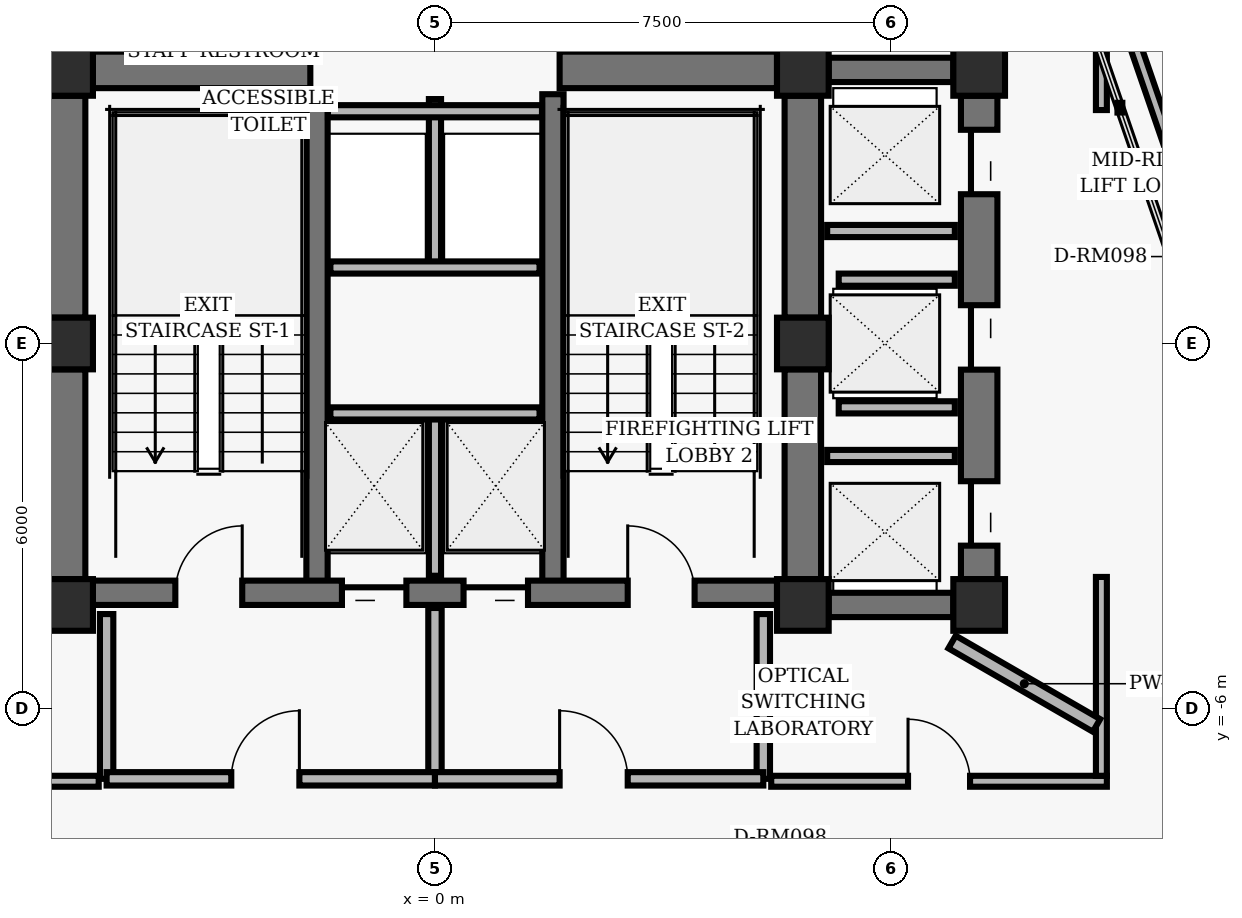
"""IFC4 building model, lengths in metres.
Left out: names, types, materials, properties, quantities, classifications, styles, units other than length and angle.
Written with IfcOpenShell. Run it as: python <this file> out.ifc"""

import sys

from ifc_helpers import new_model, si_unit, direction, frame, frame_2d, origin, origin_2d, place, context, subcontext, project, spatial, rectangle, hollow_rectangle, extrude, element, fill, save


model = new_model("IFC4")
c1 = context("Model", 3, precision=1e-05, world=origin(), true_north=direction((0.0, 1.0)))
c2 = subcontext(c1, "Body", "Model", "MODEL_VIEW")
j1 = project(units=[si_unit("LENGTHUNIT", "METRE"), si_unit("PLANEANGLEUNIT", "RADIAN")], contexts=[c1])
p1 = place(None, origin())
s1 = spatial("IfcSite", under=j1, at=p1, CompositionType="ELEMENT")
p2 = place(p1, origin())
s2 = spatial("IfcBuilding", under=s1, at=p2, CompositionType="ELEMENT")
p3 = place(p2, frame((0.0, 0.0, 165.44)))
s3 = spatial("IfcBuildingStorey", under=s2, at=p3, CompositionType="ELEMENT", Elevation=165.44)
for number, where, z_axis, x_axis in (
    (1, (-6.05, 4.5, 0.0), (0.0, 0.0, 1.0), (1.0, 0.0, 0.0)),
    (2, (6.05, 4.5, 0.0), (0.0, 0.0, 1.0), (1.0, 0.0, 0.0)),
    (3, (-6.05, 0.0, 0.0), (0.0, 0.0, 1.0), (1.0, 0.0, 0.0)),
    (4, (6.05, 0.0, 0.0), (0.0, 0.0, 1.0), (1.0, 0.0, 0.0)),
    (5, (-6.05, -4.3, 0.0), (0.0, 0.0, 1.0), (1.0, 0.0, 0.0)),
    (6, (6.05, -4.3, 0.0), (0.0, 0.0, 1.0), (1.0, 0.0, 0.0)),
    (7, (8.95, 4.5, 0.0), (0.0, 0.0, 1.0), (1.0, 0.0, 0.0)),
    (8, (8.95, -4.3, 0.0), (0.0, 0.0, 1.0), (1.0, 0.0, 0.0)),
):
    element("IfcColumn", number, at=place(p3, frame(where, z_axis=z_axis, x_axis=x_axis)), inside=s3, PredefinedType="COLUMN", context=c2, shape_type="SweptSolid", body=[
        extrude(hollow_rectangle(XDim=0.85, YDim=0.85, WallThickness=0.055, InnerFilletRadius=0.02, OuterFilletRadius=0.04, at=origin_2d()), origin(), (0.0, 0.0, 1.0), 3.04),
    ])
p4 = place(p3, frame((-6.05, 0.425, 0.0), z_axis=(0.0, 0.0, 1.0), x_axis=(0.0, 1.0, 0.0)))
e9 = element("IfcWall", 9, at=p4, inside=s3, PredefinedType="SHEAR", context=c2, shape_type="SweptSolid", body=[
    extrude(rectangle(XDim=3.65, YDim=0.6, at=frame_2d((1.825, 0.0))), origin(), (0.0, 0.0, 1.0), 2.788),
])
p5 = place(p3, frame((-6.05, -3.875, 0.0), z_axis=(0.0, 0.0, 1.0), x_axis=(0.0, 1.0, 0.0)))
e10 = element("IfcWall", 10, at=p5, inside=s3, PredefinedType="SHEAR", context=c2, shape_type="SweptSolid", body=[
    extrude(rectangle(XDim=3.45, YDim=0.6, at=frame_2d((1.725, 0.0))), origin(), (0.0, 0.0, 1.0), 2.788),
])
p6 = place(p3, frame((6.05, 0.425, 0.0), z_axis=(0.0, 0.0, 1.0), x_axis=(0.0, 1.0, 0.0)))
e11 = element("IfcWall", 11, at=p6, inside=s3, PredefinedType="SHEAR", context=c2, shape_type="SweptSolid", body=[
    extrude(rectangle(XDim=3.65, YDim=0.6, at=frame_2d((1.825, 0.0))), origin(), (0.0, 0.0, 1.0), 2.788),
])
p7 = place(p3, frame((6.05, -3.875, 0.0), z_axis=(0.0, 0.0, 1.0), x_axis=(0.0, 1.0, 0.0)))
e12 = element("IfcWall", 12, at=p7, inside=s3, PredefinedType="SHEAR", context=c2, shape_type="SweptSolid", body=[
    extrude(rectangle(XDim=3.45, YDim=0.6, at=frame_2d((1.725, 0.0))), origin(), (0.0, 0.0, 1.0), 2.788),
])
for number, where, z_axis, x_axis in (
    (13, (-1.94, -4.1, 0.0), (0.0, 0.0, 1.0), (0.0, 1.0, 0.0)),
    (14, (1.94, -4.1, 0.0), (0.0, 0.0, 1.0), (0.0, 1.0, 0.0)),
):
    element("IfcWall", number, at=place(p3, frame(where, z_axis=z_axis, x_axis=x_axis)), inside=s3, PredefinedType="SHEAR", context=c2, shape_type="SweptSolid", body=[
        extrude(rectangle(XDim=8.2, YDim=0.35, at=frame_2d((4.1, 0.0))), origin(), (0.0, 0.0, 1.0), 2.788),
    ])
p8 = place(p3, frame((-5.625, -4.1, 0.0), z_axis=(0.0, 0.0, 1.0), x_axis=(1.0, 0.0, 0.0)))
e15 = element("IfcWall", 15, at=p8, inside=s3, PredefinedType="SHEAR", context=c2, shape_type="SweptSolid", body=[
    extrude(rectangle(XDim=11.25, YDim=0.4, at=frame_2d((5.625, 0.0))), origin(), (0.0, 0.0, 1.0), 2.788),
])
p9 = place(p8, frame((1.355, 0.0, 0.0)))
e16 = element("IfcOpeningElement", 16, at=p9, cuts=e15, PredefinedType="OPENING", context=c2, shape_type="SweptSolid", body=[
    extrude(rectangle(XDim=1.1, YDim=2.04, at=frame_2d((0.55, 1.02))), frame((0.0, 0.21, 0.0), z_axis=(0.0, -1.0, 0.0), x_axis=(1.0, 0.0, 0.0)), (0.0, 0.0, 1.0), 0.42),
])
p10 = place(p8, frame((8.795, 0.0, 0.0)))
e17 = element("IfcOpeningElement", 17, at=p10, cuts=e15, PredefinedType="OPENING", context=c2, shape_type="SweptSolid", body=[
    extrude(rectangle(XDim=1.1, YDim=2.04, at=frame_2d((0.55, 1.02))), frame((0.0, 0.21, 0.0), z_axis=(0.0, -1.0, 0.0), x_axis=(1.0, 0.0, 0.0)), (0.0, 0.0, 1.0), 0.42),
])
p11 = place(p8, frame((4.095, 0.0, 0.0)))
e18 = element("IfcOpeningElement", 18, at=p11, cuts=e15, PredefinedType="OPENING", context=c2, shape_type="SweptSolid", body=[
    extrude(rectangle(XDim=1.06, YDim=2.04, at=frame_2d((0.53, 1.02))), frame((0.0, 0.21, 0.0), z_axis=(0.0, -1.0, 0.0), x_axis=(1.0, 0.0, 0.0)), (0.0, 0.0, 1.0), 0.42),
])
p12 = place(p8, frame((6.095, 0.0, 0.0)))
e19 = element("IfcOpeningElement", 19, at=p12, cuts=e15, PredefinedType="OPENING", context=c2, shape_type="SweptSolid", body=[
    extrude(rectangle(XDim=1.06, YDim=2.04, at=frame_2d((0.53, 1.02))), frame((0.0, 0.21, 0.0), z_axis=(0.0, -1.0, 0.0), x_axis=(1.0, 0.0, 0.0)), (0.0, 0.0, 1.0), 0.42),
])
for number, where, z_axis, x_axis in (
    (20, (-5.625, 4.5, 0.0), (0.0, 0.0, 1.0), (1.0, 0.0, 0.0)),
    (21, (2.05, 4.5, 0.0), (0.0, 0.0, 1.0), (1.0, 0.0, 0.0)),
):
    element("IfcWall", number, at=place(p3, frame(where, z_axis=z_axis, x_axis=x_axis)), inside=s3, PredefinedType="SHEAR", context=c2, shape_type="SweptSolid", body=[
        extrude(rectangle(XDim=3.575, YDim=0.6, at=frame_2d((1.788, 0.0))), origin(), (0.0, 0.0, 1.0), 2.788),
    ])
p13 = place(p3, frame((8.95, -3.875, 0.0), z_axis=(0.0, 0.0, 1.0), x_axis=(0.0, 1.0, 0.0)))
e22 = element("IfcWall", 22, at=p13, inside=s3, PredefinedType="SHEAR", context=c2, shape_type="SweptSolid", body=[
    extrude(rectangle(XDim=7.95, YDim=0.6, at=frame_2d((3.975, 0.0))), origin(), (0.0, 0.0, 1.0), 2.788),
])
p14 = place(p13, frame((0.55, 0.0, 0.0)))
e23 = element("IfcOpeningElement", 23, at=p14, cuts=e22, PredefinedType="OPENING", context=c2, shape_type="SweptSolid", body=[
    extrude(rectangle(XDim=1.06, YDim=2.04, at=frame_2d((0.53, 1.02))), frame((0.0, 0.31, 0.0), z_axis=(0.0, -1.0, 0.0), x_axis=(1.0, 0.0, 0.0)), (0.0, 0.0, 1.0), 0.62),
])
p15 = place(p13, frame((3.445, 0.0, 0.0)))
e24 = element("IfcOpeningElement", 24, at=p15, cuts=e22, PredefinedType="OPENING", context=c2, shape_type="SweptSolid", body=[
    extrude(rectangle(XDim=1.06, YDim=2.04, at=frame_2d((0.53, 1.02))), frame((0.0, 0.31, 0.0), z_axis=(0.0, -1.0, 0.0), x_axis=(1.0, 0.0, 0.0)), (0.0, 0.0, 1.0), 0.62),
])
p16 = place(p13, frame((6.33, 0.0, 0.0)))
e25 = element("IfcOpeningElement", 25, at=p16, cuts=e22, PredefinedType="OPENING", context=c2, shape_type="SweptSolid", body=[
    extrude(rectangle(XDim=1.06, YDim=2.04, at=frame_2d((0.53, 1.02))), frame((0.0, 0.31, 0.0), z_axis=(0.0, -1.0, 0.0), x_axis=(1.0, 0.0, 0.0)), (0.0, 0.0, 1.0), 0.62),
])
for number, where, z_axis, x_axis in (
    (26, (6.475, 4.5, 0.0), (0.0, 0.0, 1.0), (1.0, 0.0, 0.0)),
    (27, (6.475, -4.3, 0.0), (0.0, 0.0, 1.0), (1.0, 0.0, 0.0)),
):
    element("IfcWall", number, at=place(p3, frame(where, z_axis=z_axis, x_axis=x_axis)), inside=s3, PredefinedType="SHEAR", context=c2, shape_type="SweptSolid", body=[
        extrude(rectangle(XDim=2.05, YDim=0.4, at=frame_2d((1.025, 0.0))), origin(), (0.0, 0.0, 1.0), 2.788),
    ])
p17 = place(p3, frame((0.0, -3.82, 0.0), z_axis=(0.0, 0.0, 1.0), x_axis=(0.0, 1.0, 0.0)))
e28 = element("IfcWall", 28, at=p17, inside=s3, PredefinedType="PARTITIONING", context=c2, shape_type="SweptSolid", body=[
    extrude(rectangle(XDim=2.67, YDim=0.2, at=frame_2d((1.335, 0.0))), origin(), (0.0, 0.0, 1.0), 2.763),
])
p18 = place(p3, frame((-1.72, -1.15, 0.0), z_axis=(0.0, 0.0, 1.0), x_axis=(1.0, 0.0, 0.0)))
e29 = element("IfcWall", 29, at=p18, inside=s3, PredefinedType="PARTITIONING", context=c2, shape_type="SweptSolid", body=[
    extrude(rectangle(XDim=3.44, YDim=0.2, at=frame_2d((1.72, 0.0))), origin(), (0.0, 0.0, 1.0), 2.763),
])
for number, where, z_axis, x_axis in (
    (30, (-5.4, -7.16, 0.0), (0.0, 0.0, 1.0), (0.0, 1.0, 0.0)),
    (31, (5.4, -7.16, 0.0), (0.0, 0.0, 1.0), (0.0, 1.0, 0.0)),
):
    element("IfcWall", number, at=place(p3, frame(where, z_axis=z_axis, x_axis=x_axis)), inside=s3, PredefinedType="PARTITIONING", context=c2, shape_type="SweptSolid", body=[
        extrude(rectangle(XDim=2.71, YDim=0.22, at=frame_2d((1.355, 0.0))), origin(), (0.0, 0.0, 1.0), 2.763),
    ])
p19 = place(p3, frame((0.0, -7.16, 0.0), z_axis=(0.0, 0.0, 1.0), x_axis=(0.0, 1.0, 0.0)))
e32 = element("IfcWall", 32, at=p19, inside=s3, PredefinedType="PARTITIONING", context=c2, shape_type="SweptSolid", body=[
    extrude(rectangle(XDim=2.81, YDim=0.22, at=frame_2d((1.405, 0.0))), origin(), (0.0, 0.0, 1.0), 2.763),
])
p20 = place(p3, frame((-5.4, -7.16, 0.0), z_axis=(0.0, 0.0, 1.0), x_axis=(1.0, 0.0, 0.0)))
e33 = element("IfcWall", 33, at=p20, inside=s3, PredefinedType="PARTITIONING", context=c2, shape_type="SweptSolid", body=[
    extrude(rectangle(XDim=5.4, YDim=0.22, at=frame_2d((2.7, 0.0))), origin(), (0.0, 0.0, 1.0), 2.33),
])
p21 = place(p20, frame((2.05, 0.0, 0.0)))
e34 = element("IfcOpeningElement", 34, at=p21, cuts=e33, PredefinedType="OPENING", context=c2, shape_type="SweptSolid", body=[
    extrude(rectangle(XDim=1.12, YDim=2.02, at=frame_2d((0.56, 1.01))), frame((0.0, 0.12, 0.0), z_axis=(0.0, -1.0, 0.0), x_axis=(1.0, 0.0, 0.0)), (0.0, 0.0, 1.0), 0.24),
])
p22 = place(p3, frame((0.0, -7.16, 0.0), z_axis=(0.0, 0.0, 1.0), x_axis=(1.0, 0.0, 0.0)))
e35 = element("IfcWall", 35, at=p22, inside=s3, PredefinedType="PARTITIONING", context=c2, shape_type="SweptSolid", body=[
    extrude(rectangle(XDim=5.4, YDim=0.22, at=frame_2d((2.7, 0.0))), origin(), (0.0, 0.0, 1.0), 2.33),
])
p23 = place(p22, frame((2.05, 0.0, 0.0)))
e36 = element("IfcOpeningElement", 36, at=p23, cuts=e35, PredefinedType="OPENING", context=c2, shape_type="SweptSolid", body=[
    extrude(rectangle(XDim=1.12, YDim=2.02, at=frame_2d((0.56, 1.01))), frame((0.0, 0.12, 0.0), z_axis=(0.0, -1.0, 0.0), x_axis=(1.0, 0.0, 0.0)), (0.0, 0.0, 1.0), 0.24),
])
p24 = place(p3, frame((0.0, 1.25, 0.0), z_axis=(0.0, 0.0, 1.0), x_axis=(0.0, 1.0, 0.0)))
e37 = element("IfcWall", 37, at=p24, inside=s3, PredefinedType="PARTITIONING", context=c2, shape_type="SweptSolid", body=[
    extrude(rectangle(XDim=2.77, YDim=0.2, at=frame_2d((1.385, 0.0))), origin(), (0.0, 0.0, 1.0), 2.763),
])
p25 = place(p3, frame((-1.72, 1.25, 0.0), z_axis=(0.0, 0.0, 1.0), x_axis=(1.0, 0.0, 0.0)))
e38 = element("IfcWall", 38, at=p25, inside=s3, PredefinedType="PARTITIONING", context=c2, shape_type="SweptSolid", body=[
    extrude(rectangle(XDim=3.44, YDim=0.2, at=frame_2d((1.72, 0.0))), origin(), (0.0, 0.0, 1.0), 2.763),
])
p26 = place(p3, frame((-1.76, 3.82, 0.0), z_axis=(0.0, 0.0, 1.0), x_axis=(1.0, 0.0, 0.0)))
e39 = element("IfcWall", 39, at=p26, inside=s3, PredefinedType="PARTITIONING", context=c2, shape_type="SweptSolid", body=[
    extrude(rectangle(XDim=3.52, YDim=0.2, at=frame_2d((1.76, 0.0))), origin(), (0.0, 0.0, 1.0), 2.763),
])
for number, where, z_axis, x_axis in (
    (40, (6.45, -1.85, 0.0), (0.0, 0.0, 1.0), (1.0, 0.0, 0.0)),
    (41, (6.45, 1.85, 0.0), (0.0, 0.0, 1.0), (1.0, 0.0, 0.0)),
):
    element("IfcWall", number, at=place(p3, frame(where, z_axis=z_axis, x_axis=x_axis)), inside=s3, PredefinedType="PARTITIONING", context=c2, shape_type="SweptSolid", body=[
        extrude(rectangle(XDim=2.1, YDim=0.2, at=frame_2d((1.05, 0.0))), origin(), (0.0, 0.0, 1.0), 2.763),
    ])
for number, where, z_axis, x_axis in (
    (42, (6.64, -1.05, 0.0), (0.0, 0.0, 1.0), (1.0, 0.0, 0.0)),
    (43, (6.64, 1.05, 0.0), (0.0, 0.0, 1.0), (1.0, 0.0, 0.0)),
):
    element("IfcWall", number, at=place(p3, frame(where, z_axis=z_axis, x_axis=x_axis)), inside=s3, PredefinedType="PARTITIONING", context=c2, shape_type="SweptSolid", body=[
        extrude(rectangle(XDim=1.91, YDim=0.2, at=frame_2d((0.955, 0.0))), origin(), (0.0, 0.0, 1.0), 2.763),
    ])
p27 = place(p3, frame((-6.59, -7.2, 0.0), z_axis=(0.0, 0.0, 1.0), x_axis=(1.0, 0.0, 0.0)))
e44 = element("IfcWall", 44, at=p27, inside=s3, PredefinedType="PARTITIONING", context=c2, shape_type="SweptSolid", body=[
    extrude(rectangle(XDim=1.06, YDim=0.18, at=frame_2d((0.53, 0.0))), origin(), (0.0, 0.0, 1.0), 2.763),
])
p28 = place(p3, frame((5.53, -7.2, 0.0), z_axis=(0.0, 0.0, 1.0), x_axis=(1.0, 0.0, 0.0)))
e45 = element("IfcWall", 45, at=p28, inside=s3, PredefinedType="PARTITIONING", context=c2, shape_type="SweptSolid", body=[
    extrude(rectangle(XDim=5.52, YDim=0.18, at=frame_2d((2.76, 0.0))), origin(), (0.0, 0.0, 1.0), 2.33),
])
p29 = place(p28, frame((2.25, 0.0, 0.0)))
e46 = element("IfcOpeningElement", 46, at=p29, cuts=e45, PredefinedType="OPENING", context=c2, shape_type="SweptSolid", body=[
    extrude(rectangle(XDim=1.02, YDim=2.02, at=frame_2d((0.51, 1.01))), frame((0.0, 0.1, 0.0), z_axis=(0.0, -1.0, 0.0), x_axis=(1.0, 0.0, 0.0)), (0.0, 0.0, 1.0), 0.2),
])
p30 = place(p3, frame((10.96, -7.11, 0.0), z_axis=(0.0, 0.0, 1.0), x_axis=(0.0, 1.0, 0.0)))
e47 = element("IfcWall", 47, at=p30, inside=s3, PredefinedType="PARTITIONING", context=c2, shape_type="SweptSolid", body=[
    extrude(rectangle(XDim=3.271, YDim=0.18, at=frame_2d((1.635, 0.0))), origin(), (0.0, 0.0, 1.0), 2.763),
])
p31 = place(p3, frame((10.96, 3.84, 0.0), z_axis=(0.0, 0.0, 1.0), x_axis=(0.0, 1.0, 0.0)))
e48 = element("IfcWall", 48, at=p31, inside=s3, PredefinedType="PARTITIONING", context=c2, shape_type="SweptSolid", body=[
    extrude(rectangle(XDim=2.694, YDim=0.18, at=frame_2d((1.347, 0.0))), origin(), (0.0, 0.0, 1.0), 2.33),
])
p32 = place(p3, frame((10.954, 6.533, 0.0), z_axis=(0.0, 0.0, 1.0), x_axis=(0.325553439946, -0.945523642084, 0.0)))
e49 = element("IfcWall", 49, at=p32, inside=s3, PredefinedType="PARTITIONING", context=c2, shape_type="SweptSolid", body=[
    extrude(rectangle(XDim=11.22, YDim=0.18, at=frame_2d((5.61, 0.0))), origin(), (0.0, 0.0, 1.0), 2.763),
])
p33 = place(p32, frame((5.311, 0.0, 0.0)))
e50 = element("IfcOpeningElement", 50, at=p33, cuts=e49, PredefinedType="OPENING", context=c2, shape_type="SweptSolid", body=[
    extrude(rectangle(XDim=0.96, YDim=2.02, at=frame_2d((0.48, 1.01))), frame((0.0, 0.1, 0.0), z_axis=(0.0, -1.0, 0.0), x_axis=(1.0, 0.0, 0.0)), (0.0, 0.0, 1.0), 0.2),
])
p34 = place(p3, frame((8.504, -4.91, 0.0), z_axis=(0.0, 0.0, 1.0), x_axis=(0.866010685746, -0.500025491523, 0.0)))
e51 = element("IfcWall", 51, at=p34, inside=s3, PredefinedType="PARTITIONING", context=c2, shape_type="SweptSolid", body=[
    extrude(rectangle(XDim=2.743, YDim=0.24, at=frame_2d((1.372, 0.0))), origin(), (0.0, 0.0, 1.0), 2.763),
])
p35 = place(p9, origin())
e52 = element("IfcDoor", 52, at=p35, inside=s3, OperationType="SINGLE_SWING_RIGHT", PredefinedType="DOOR", context=c2, shape_type="SweptSolid", body=[
    extrude(rectangle(XDim=1.1, YDim=2.04, at=frame_2d((0.55, 1.02))), frame((0.0, 0.025, 0.0), z_axis=(0.0, -1.0, 0.0), x_axis=(1.0, 0.0, 0.0)), (0.0, 0.0, 1.0), 0.05),
])
fill(e16, e52)
p36 = place(p10, origin())
e53 = element("IfcDoor", 53, at=p36, inside=s3, OperationType="SINGLE_SWING_LEFT", PredefinedType="DOOR", context=c2, shape_type="SweptSolid", body=[
    extrude(rectangle(XDim=1.1, YDim=2.04, at=frame_2d((0.55, 1.02))), frame((0.0, 0.025, 0.0), z_axis=(0.0, -1.0, 0.0), x_axis=(1.0, 0.0, 0.0)), (0.0, 0.0, 1.0), 0.05),
])
fill(e17, e53)
p37 = place(p11, origin())
e54 = element("IfcDoor", 54, at=p37, inside=s3, OperationType="SLIDING_TO_LEFT", PredefinedType="DOOR", context=c2, shape_type="SweptSolid", body=[
    extrude(rectangle(XDim=1.06, YDim=2.04, at=frame_2d((0.53, 1.02))), frame((0.0, 0.025, 0.0), z_axis=(0.0, -1.0, 0.0), x_axis=(1.0, 0.0, 0.0)), (0.0, 0.0, 1.0), 0.05),
])
fill(e18, e54)
p38 = place(p12, origin())
e55 = element("IfcDoor", 55, at=p38, inside=s3, OperationType="SLIDING_TO_RIGHT", PredefinedType="DOOR", context=c2, shape_type="SweptSolid", body=[
    extrude(rectangle(XDim=1.06, YDim=2.04, at=frame_2d((0.53, 1.02))), frame((0.0, 0.025, 0.0), z_axis=(0.0, -1.0, 0.0), x_axis=(1.0, 0.0, 0.0)), (0.0, 0.0, 1.0), 0.05),
])
fill(e19, e55)
p39 = place(p21, origin())
e56 = element("IfcDoor", 56, at=p39, inside=s3, OperationType="SINGLE_SWING_RIGHT", PredefinedType="DOOR", context=c2, shape_type="SweptSolid", body=[
    extrude(rectangle(XDim=1.12, YDim=2.02, at=frame_2d((0.56, 1.01))), frame((0.0, 0.025, 0.0), z_axis=(0.0, -1.0, 0.0), x_axis=(1.0, 0.0, 0.0)), (0.0, 0.0, 1.0), 0.05),
])
fill(e34, e56)
p40 = place(p23, origin())
e57 = element("IfcDoor", 57, at=p40, inside=s3, OperationType="SINGLE_SWING_LEFT", PredefinedType="DOOR", context=c2, shape_type="SweptSolid", body=[
    extrude(rectangle(XDim=1.12, YDim=2.02, at=frame_2d((0.56, 1.01))), frame((0.0, 0.025, 0.0), z_axis=(0.0, -1.0, 0.0), x_axis=(1.0, 0.0, 0.0)), (0.0, 0.0, 1.0), 0.05),
])
fill(e36, e57)
p41 = place(p14, origin())
e58 = element("IfcDoor", 58, at=p41, inside=s3, OperationType="SLIDING_TO_LEFT", PredefinedType="DOOR", context=c2, shape_type="SweptSolid", body=[
    extrude(rectangle(XDim=1.06, YDim=2.04, at=frame_2d((0.53, 1.02))), frame((0.0, 0.025, 0.0), z_axis=(0.0, -1.0, 0.0), x_axis=(1.0, 0.0, 0.0)), (0.0, 0.0, 1.0), 0.05),
])
fill(e23, e58)
p42 = place(p15, origin())
e59 = element("IfcDoor", 59, at=p42, inside=s3, OperationType="SLIDING_TO_RIGHT", PredefinedType="DOOR", context=c2, shape_type="SweptSolid", body=[
    extrude(rectangle(XDim=1.06, YDim=2.04, at=frame_2d((0.53, 1.02))), frame((0.0, 0.025, 0.0), z_axis=(0.0, -1.0, 0.0), x_axis=(1.0, 0.0, 0.0)), (0.0, 0.0, 1.0), 0.05),
])
fill(e24, e59)
p43 = place(p16, origin())
e60 = element("IfcDoor", 60, at=p43, inside=s3, OperationType="SLIDING_TO_LEFT", PredefinedType="DOOR", context=c2, shape_type="SweptSolid", body=[
    extrude(rectangle(XDim=1.06, YDim=2.04, at=frame_2d((0.53, 1.02))), frame((0.0, 0.025, 0.0), z_axis=(0.0, -1.0, 0.0), x_axis=(1.0, 0.0, 0.0)), (0.0, 0.0, 1.0), 0.05),
])
fill(e25, e60)
p44 = place(p29, origin())
e61 = element("IfcDoor", 61, at=p44, inside=s3, OperationType="SINGLE_SWING_LEFT", PredefinedType="DOOR", context=c2, shape_type="SweptSolid", body=[
    extrude(rectangle(XDim=1.02, YDim=2.02, at=frame_2d((0.51, 1.01))), frame((0.0, 0.025, 0.0), z_axis=(0.0, -1.0, 0.0), x_axis=(1.0, 0.0, 0.0)), (0.0, 0.0, 1.0), 0.05),
])
fill(e46, e61)
save(model, sys.argv[1])
